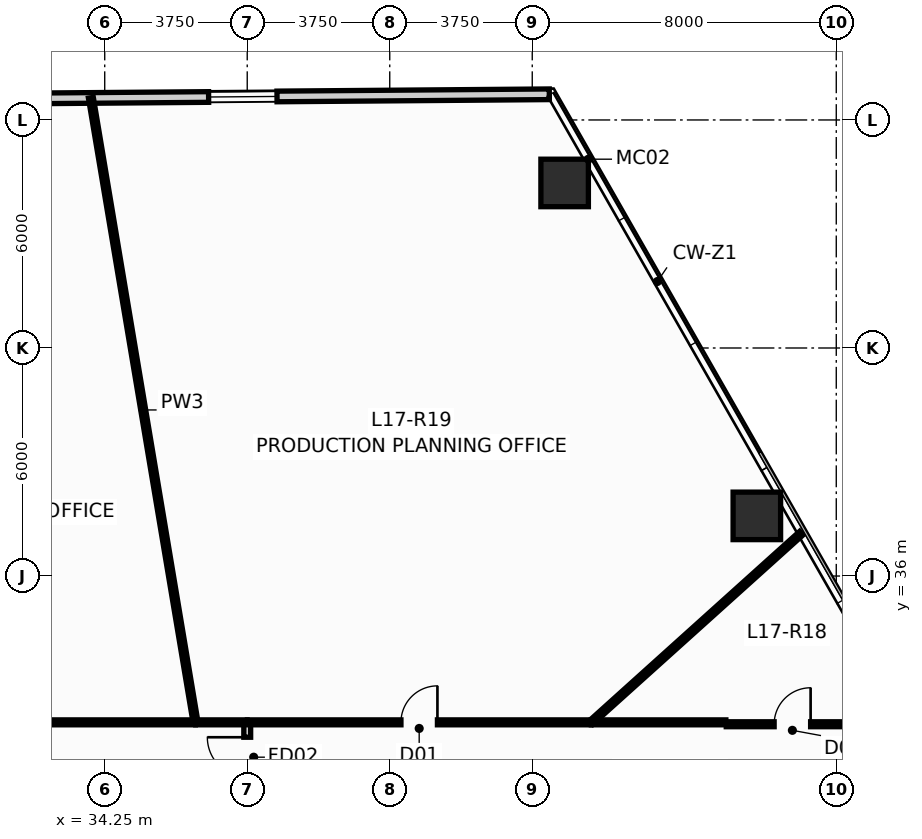
"""IFC4 building model, lengths in metres.
Left out: names, types, materials, properties, quantities, classifications, styles, units other than length and angle.
Written with IfcOpenShell. Run it as: python <this file> out.ifc"""

import sys

from ifc_helpers import new_model, si_unit, direction, frame, frame_2d, origin, origin_2d, place, context, subcontext, project, spatial, rectangle, hollow_rectangle, extrude, source, transform, mapped, element, fill, save


model = new_model("IFC4")
c1 = context("Model", 3, precision=1e-05, world=origin(), true_north=direction((0.0, 1.0)))
c2 = subcontext(c1, "Body", "Model", "MODEL_VIEW")
j1 = project(units=[si_unit("LENGTHUNIT", "METRE"), si_unit("PLANEANGLEUNIT", "RADIAN")], contexts=[c1])
p1 = place(None, origin())
s1 = spatial("IfcSite", under=j1, at=p1, CompositionType="ELEMENT")
p2 = place(p1, origin())
s2 = spatial("IfcBuilding", under=s1, at=p2, CompositionType="ELEMENT")
p3 = place(p2, frame((0.0, 0.0, 67.75)))
s3 = spatial("IfcBuildingStorey", under=s2, at=p3, CompositionType="ELEMENT", Elevation=67.75)
m1 = source(origin(), c2, "Body", "SweptSolid", [
    extrude(hollow_rectangle(XDim=1.25, YDim=1.25, WallThickness=0.07, at=origin_2d()), origin(), (0.0, 0.0, 1.0), 3.651),
])
p4 = place(p3, frame((46.352, 46.343, 0.0), z_axis=(-0.023872756997, 0.001738632162, 0.999713493273), x_axis=(-0.07263675076, -0.997358462359, 0.0)))
e1 = element("IfcColumn", 1, at=p4, inside=s3, PredefinedType="COLUMN", context=c2, shape_type="MappedRepresentation", body=[
    mapped(m1, transform((0.0, 0.0, 0.0), scale=1.0)),
])
m2 = source(origin(), c2, "Body", "SweptSolid", [
    extrude(hollow_rectangle(XDim=1.25, YDim=1.25, WallThickness=0.07, at=origin_2d()), origin(), (0.0, 0.0, 1.0), 3.651),
])
p5 = place(p3, frame((51.41, 37.583, 0.0), z_axis=(-0.019393993486, -0.006018825565, 0.999793802119), x_axis=(0.296399214872, -0.955064136811, 0.0)))
e2 = element("IfcColumn", 2, at=p5, inside=s3, PredefinedType="COLUMN", context=c2, shape_type="MappedRepresentation", body=[
    mapped(m2, transform((0.0, 0.0, 0.0), scale=1.0)),
])
p6 = place(p3, frame((29.824, 48.547, 0.0), z_axis=(0.0, 0.0, 1.0), x_axis=(0.999968168936, 0.007978791561, 0.0)))
e3 = element("IfcWall", 3, at=p6, inside=s3, PredefinedType="STANDARD", context=c2, shape_type="SweptSolid", body=[
    extrude(rectangle(XDim=16.125, YDim=0.28, at=frame_2d((8.063, 0.0))), origin(), (0.0, 0.0, 1.0), 3.4),
])
p7 = place(p6, frame((7.16, 0.0, 0.9)))
e4 = element("IfcOpeningElement", 4, at=p7, cuts=e3, PredefinedType="OPENING", context=c2, shape_type="SweptSolid", body=[
    extrude(rectangle(XDim=1.8, YDim=1.8, at=frame_2d((0.9, 0.9))), frame((0.0, 0.152, 0.0), z_axis=(0.0, -1.0, 0.0), x_axis=(1.0, 0.0, 0.0)), (0.0, 0.0, 1.0), 0.304),
])
p8 = place(p3, frame((33.886, 48.584, 0.0), z_axis=(0.0, 0.0, 1.0), x_axis=(0.165256873568, -0.98625055931, 0.0)))
e5 = element("IfcWall", 5, at=p8, inside=s3, PredefinedType="PARTITIONING", context=c2, shape_type="SweptSolid", body=[
    extrude(rectangle(XDim=16.658, YDim=0.13, at=frame_2d((8.329, 0.0))), origin(), (0.0, 0.0, 1.0), 3.4),
])
p9 = place(p3, frame((25.405, 32.15, 0.0), z_axis=(0.0, 0.0, 1.0), x_axis=(1.0, 0.0, 0.0)))
e6 = element("IfcWall", 6, at=p9, inside=s3, PredefinedType="PARTITIONING", context=c2, shape_type="SweptSolid", body=[
    extrude(rectangle(XDim=11.23, YDim=0.13, at=frame_2d((5.615, 0.0))), origin(), (0.0, 0.0, 1.0), 3.026),
])
p10 = place(p9, frame((5.135, 0.0, 0.0)))
e7 = element("IfcOpeningElement", 7, at=p10, cuts=e6, PredefinedType="OPENING", context=c2, shape_type="SweptSolid", body=[
    extrude(rectangle(XDim=0.96, YDim=2.15, at=frame_2d((0.48, 1.075))), frame((0.0, 0.077, 0.0), z_axis=(0.0, -1.0, 0.0), x_axis=(1.0, 0.0, 0.0)), (0.0, 0.0, 1.0), 0.154),
])
p11 = place(p3, frame((38.005, 32.15, 0.0), z_axis=(0.0, 0.0, 1.0), x_axis=(1.0, 0.0, 0.0)))
e8 = element("IfcWall", 8, at=p11, inside=s3, PredefinedType="PARTITIONING", context=c2, shape_type="SweptSolid", body=[
    extrude(rectangle(XDim=9.04, YDim=0.13, at=frame_2d((4.52, 0.0))), origin(), (0.0, 0.0, 1.0), 3.026),
])
p12 = place(p11, frame((4.04, 0.0, 0.0)))
e9 = element("IfcOpeningElement", 9, at=p12, cuts=e8, PredefinedType="OPENING", context=c2, shape_type="SweptSolid", body=[
    extrude(rectangle(XDim=0.96, YDim=2.15, at=frame_2d((0.48, 1.075))), frame((0.0, 0.077, 0.0), z_axis=(0.0, -1.0, 0.0), x_axis=(1.0, 0.0, 0.0)), (0.0, 0.0, 1.0), 0.154),
])
p13 = place(p3, frame((47.054, 32.153, 0.0), z_axis=(0.0, 0.0, 1.0), x_axis=(0.743263128227, 0.668999194482, 0.0)))
e10 = element("IfcWall", 10, at=p13, inside=s3, PredefinedType="PARTITIONING", context=c2, shape_type="SweptSolid", body=[
    extrude(rectangle(XDim=7.436, YDim=0.13, at=frame_2d((3.718, 0.0))), origin(), (0.0, 0.0, 1.0), 2.783),
])
p14 = place(p3, frame((50.605, 32.1, 0.0), z_axis=(0.0, 0.0, 1.0), x_axis=(1.0, 0.0, 0.0)))
e11 = element("IfcWall", 11, at=p14, inside=s3, PredefinedType="PARTITIONING", context=c2, shape_type="SweptSolid", body=[
    extrude(rectangle(XDim=4.848, YDim=0.13, at=frame_2d((2.424, 0.0))), origin(), (0.0, 0.0, 1.0), 3.4),
])
p15 = place(p14, frame((1.26, 0.0, 0.0)))
e12 = element("IfcOpeningElement", 12, at=p15, cuts=e11, PredefinedType="OPENING", context=c2, shape_type="SweptSolid", body=[
    extrude(rectangle(XDim=0.96, YDim=2.15, at=frame_2d((0.48, 1.075))), frame((0.0, 0.077, 0.0), z_axis=(0.0, -1.0, 0.0), x_axis=(1.0, 0.0, 0.0)), (0.0, 0.0, 1.0), 0.154),
])
p16 = place(p3, frame((47.055, 32.15, 0.0), z_axis=(0.0, 0.0, 1.0), x_axis=(1.0, 0.0, 0.0)))
e13 = element("IfcWall", 13, at=p16, inside=s3, PredefinedType="PARTITIONING", context=c2, shape_type="SweptSolid", body=[
    extrude(rectangle(XDim=3.54, YDim=0.13, at=frame_2d((1.77, 0.0))), origin(), (0.0, 0.0, 1.0), 3.4),
])
p17 = place(p3, frame((38.0, 30.32, 0.0), z_axis=(0.0, 0.0, 1.0), x_axis=(0.0, 1.0, 0.0)))
e14 = element("IfcWall", 14, at=p17, inside=s3, PredefinedType="PARTITIONING", context=c2, shape_type="SweptSolid", body=[
    extrude(rectangle(XDim=1.825, YDim=0.18, at=frame_2d((0.913, 0.0))), origin(), (0.0, 0.0, 1.0), 3.4),
])
p18 = place(p17, frame((0.388, 0.0, 0.0)))
e15 = element("IfcOpeningElement", 15, at=p18, cuts=e14, PredefinedType="OPENING", context=c2, shape_type="SweptSolid", body=[
    extrude(rectangle(XDim=1.05, YDim=2.15, at=frame_2d((0.525, 1.075))), frame((0.0, 0.102, 0.0), z_axis=(0.0, -1.0, 0.0), x_axis=(1.0, 0.0, 0.0)), (0.0, 0.0, 1.0), 0.204),
])
p19 = place(p3, frame((36.645, 32.15, 0.0), z_axis=(0.0, 0.0, 1.0), x_axis=(1.0, 0.0, 0.0)))
e16 = element("IfcWall", 16, at=p19, inside=s3, PredefinedType="PARTITIONING", context=c2, shape_type="SweptSolid", body=[
    extrude(rectangle(XDim=1.35, YDim=0.13, at=frame_2d((0.675, 0.0))), origin(), (0.0, 0.0, 1.0), 3.026),
])
p20 = place(p7, origin())
e17 = element("IfcWindow", 17, at=p20, inside=s3, PartitioningType="SINGLE_PANEL", PredefinedType="WINDOW", context=c2, shape_type="SweptSolid", body=[
    extrude(rectangle(XDim=1.8, YDim=1.8, at=frame_2d((0.9, 0.9))), frame((0.0, 0.03, 0.0), z_axis=(0.0, -1.0, 0.0), x_axis=(1.0, 0.0, 0.0)), (0.0, 0.0, 1.0), 0.06),
])
fill(e4, e17)
p21 = place(p12, origin())
e18 = element("IfcDoor", 18, at=p21, inside=s3, OperationType="SINGLE_SWING_RIGHT", PredefinedType="DOOR", context=c2, shape_type="SweptSolid", body=[
    extrude(rectangle(XDim=0.96, YDim=2.15, at=frame_2d((0.48, 1.075))), frame((0.0, 0.025, 0.0), z_axis=(0.0, -1.0, 0.0), x_axis=(1.0, 0.0, 0.0)), (0.0, 0.0, 1.0), 0.05),
])
fill(e9, e18)
p22 = place(p15, origin())
e19 = element("IfcDoor", 19, at=p22, inside=s3, OperationType="SINGLE_SWING_RIGHT", PredefinedType="DOOR", context=c2, shape_type="SweptSolid", body=[
    extrude(rectangle(XDim=0.96, YDim=2.15, at=frame_2d((0.48, 1.075))), frame((0.0, 0.025, 0.0), z_axis=(0.0, -1.0, 0.0), x_axis=(1.0, 0.0, 0.0)), (0.0, 0.0, 1.0), 0.05),
])
fill(e12, e19)
p23 = place(p18, origin())
e20 = element("IfcDoor", 20, at=p23, inside=s3, OperationType="SINGLE_SWING_RIGHT", PredefinedType="DOOR", context=c2, shape_type="SweptSolid", body=[
    extrude(rectangle(XDim=1.05, YDim=2.15, at=frame_2d((0.525, 1.075))), frame((0.0, 0.025, 0.0), z_axis=(0.0, -1.0, 0.0), x_axis=(1.0, 0.0, 0.0)), (0.0, 0.0, 1.0), 0.05),
])
fill(e15, e20)
save(model, sys.argv[1])
